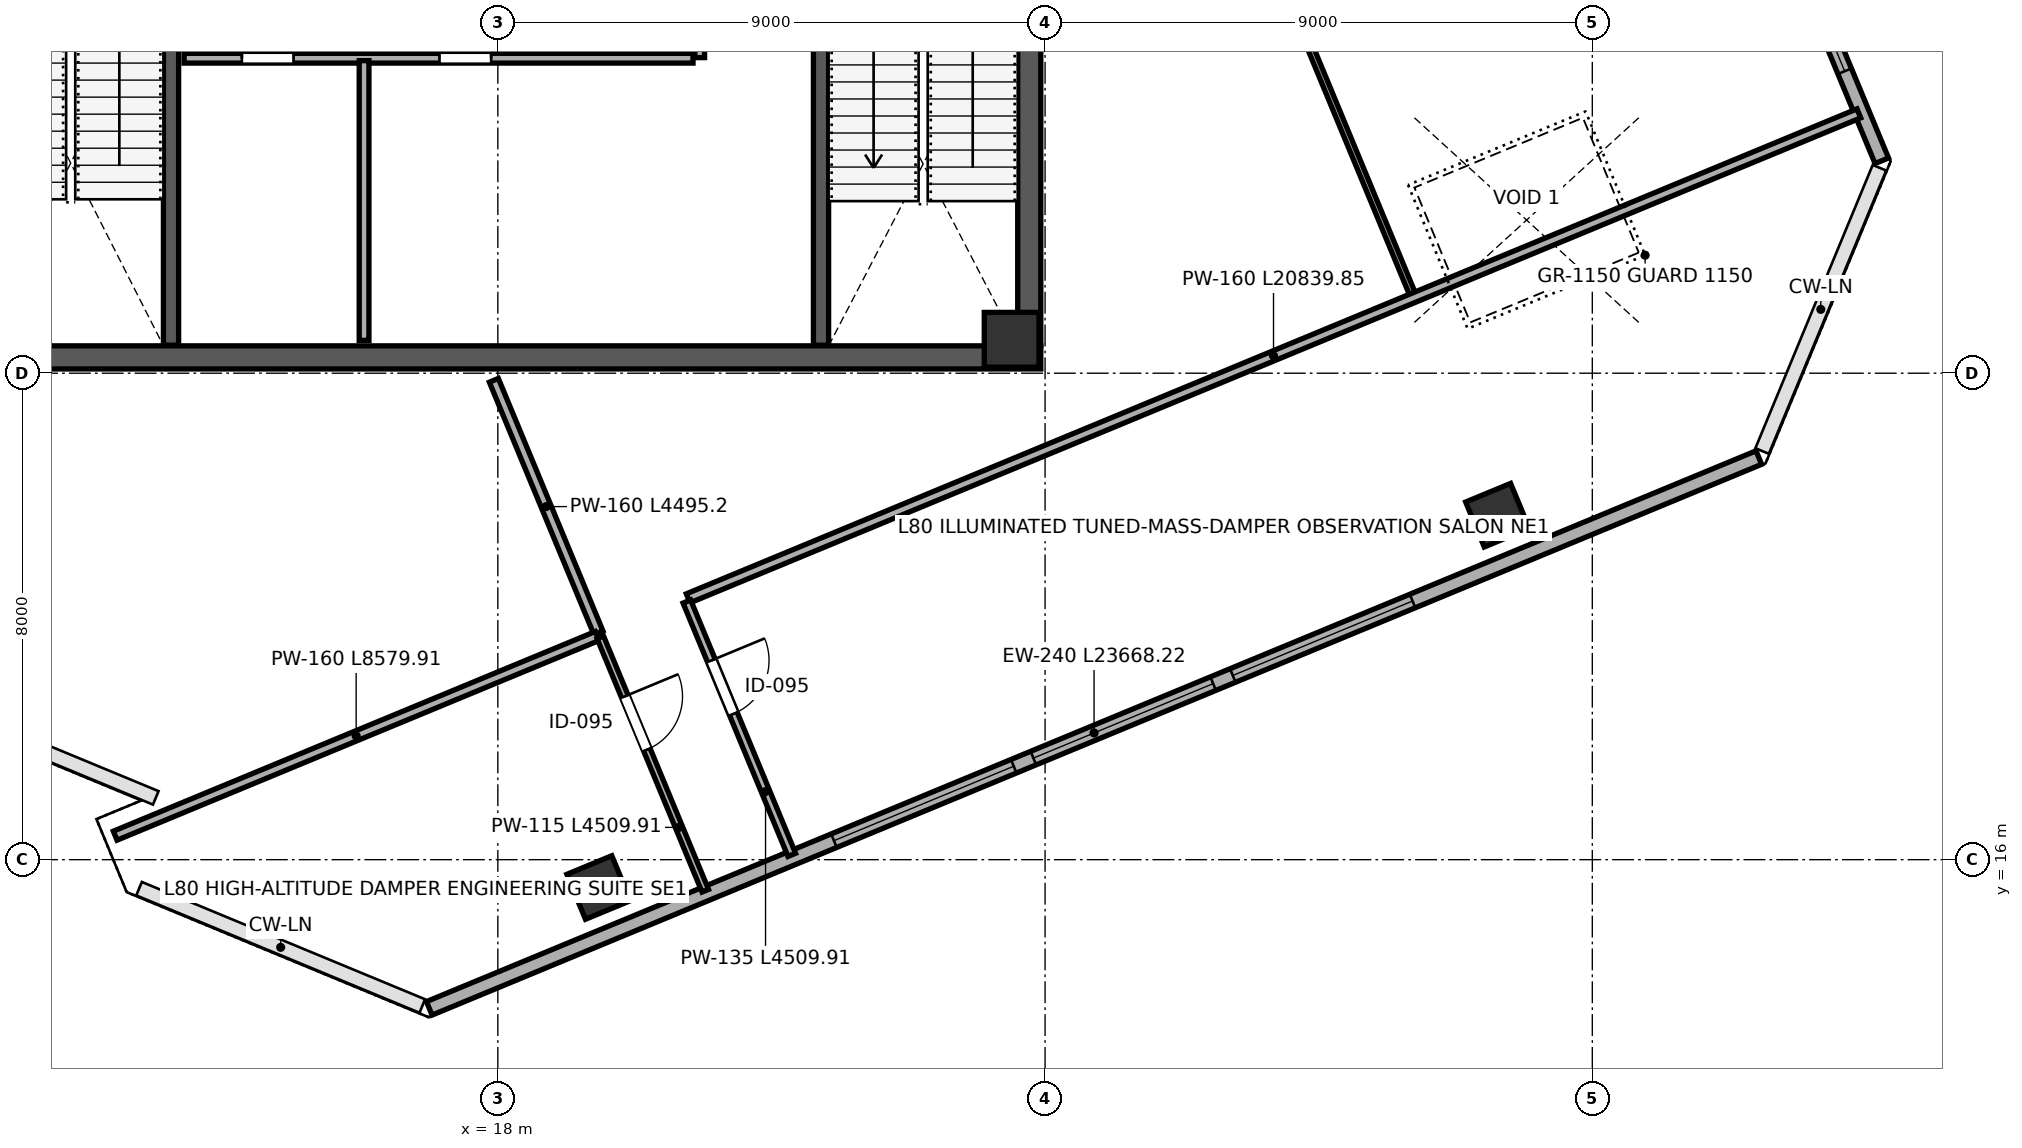
"""IFC4 building model, lengths in metres.
Left out: names, types, materials, properties, quantities, classifications, styles, units other than length and angle.
Written with IfcOpenShell. Run it as: python <this file> out.ifc"""

import sys

from ifc_helpers import new_model, si_unit, direction, frame, frame_2d, origin, origin_2d, place, context, subcontext, project, spatial, rectangle, extrude, source, transform, mapped, element, fill, save


model = new_model("IFC4")
c1 = context("Model", 3, precision=1e-05, world=origin(), true_north=direction((0.0, 1.0)))
c2 = subcontext(c1, "Body", "Model", "MODEL_VIEW")
j1 = project(units=[si_unit("LENGTHUNIT", "METRE"), si_unit("PLANEANGLEUNIT", "RADIAN")], contexts=[c1])
p1 = place(None, origin())
s1 = spatial("IfcSite", under=j1, at=p1, CompositionType="ELEMENT")
p2 = place(p1, origin())
s2 = spatial("IfcBuilding", under=s1, at=p2, CompositionType="ELEMENT")
p3 = place(p2, frame((0.0, 0.0, 355.2)))
s3 = spatial("IfcBuildingStorey", under=s2, at=p3, CompositionType="ELEMENT", Elevation=355.2)
m1 = source(origin(), c2, "Body", "SweptSolid", [
    extrude(rectangle(XDim=0.9, YDim=0.9, at=origin_2d()), origin(), (0.0, 0.0, 1.0), 4.799),
])
p4 = place(p3, frame((26.45, 24.55, 0.001), z_axis=(0.0, 0.0, 1.0), x_axis=(1.0, 0.0, 0.0)))
e1 = element("IfcColumn", 1, at=p4, inside=s3, PredefinedType="COLUMN", context=c2, shape_type="MappedRepresentation", body=[
    mapped(m1, transform((0.0, 0.0, 0.0), scale=1.0)),
])
m2 = source(origin(), c2, "Body", "SweptSolid", [
    extrude(rectangle(XDim=0.8, YDim=0.8, at=origin_2d()), origin(), (0.0, 0.0, 1.0), 4.799),
])
for number, where, z_axis, x_axis in (
    (2, (19.658, 15.542, 0.001), (0.0, 0.0, 1.0), (-0.383, 0.924, 0.0)),
    (3, (34.44, 21.665, 0.001), (0.0, 0.0, 1.0), (-0.383, 0.924, 0.0)),
):
    element("IfcColumn", number, at=place(p3, frame(where, z_axis=z_axis, x_axis=x_axis)), inside=s3, PredefinedType="COLUMN", context=c2, shape_type="MappedRepresentation", body=[
        mapped(m2, transform((0.0, 0.0, 0.0), scale=1.0)),
    ])
p5 = place(p3, frame((16.872, 13.555, 0.0), z_axis=(0.0, 0.0, 1.0), x_axis=(0.923879670053, 0.38268310031, 0.0)))
e4 = element("IfcWall", 4, at=p5, inside=s3, PredefinedType="SOLIDWALL", context=c2, shape_type="SweptSolid", body=[
    extrude(rectangle(XDim=23.668, YDim=0.24, at=frame_2d((11.834, 0.0))), origin(), (0.0, 0.0, 1.0), 4.52),
])
p6 = place(p5, frame((7.204, 0.0, 0.45)))
e5 = element("IfcOpeningElement", 5, at=p6, cuts=e4, PredefinedType="OPENING", context=c2, shape_type="SweptSolid", body=[
    extrude(rectangle(XDim=3.2, YDim=2.5, at=frame_2d((1.6, 1.25))), frame((0.0, 0.13, 0.0), z_axis=(0.0, -1.0, 0.0), x_axis=(1.0, 0.0, 0.0)), (0.0, 0.0, 1.0), 0.26),
])
p7 = place(p5, frame((10.754, 0.0, 0.45)))
e6 = element("IfcOpeningElement", 6, at=p7, cuts=e4, PredefinedType="OPENING", context=c2, shape_type="SweptSolid", body=[
    extrude(rectangle(XDim=3.2, YDim=2.5, at=frame_2d((1.6, 1.25))), frame((0.0, 0.13, 0.0), z_axis=(0.0, -1.0, 0.0), x_axis=(1.0, 0.0, 0.0)), (0.0, 0.0, 1.0), 0.26),
])
p8 = place(p5, frame((14.304, 0.0, 0.45)))
e7 = element("IfcOpeningElement", 7, at=p8, cuts=e4, PredefinedType="OPENING", context=c2, shape_type="SweptSolid", body=[
    extrude(rectangle(XDim=3.2, YDim=2.5, at=frame_2d((1.6, 1.25))), frame((0.0, 0.13, 0.0), z_axis=(0.0, -1.0, 0.0), x_axis=(1.0, 0.0, 0.0)), (0.0, 0.0, 1.0), 0.26),
])
p9 = place(p3, frame((40.761, 27.494, 0.0), z_axis=(0.0, 0.0, 1.0), x_axis=(-0.382690925775, 0.923876428604, 0.0)))
e8 = element("IfcWall", 8, at=p9, inside=s3, PredefinedType="SOLIDWALL", context=c2, shape_type="SweptSolid", body=[
    extrude(rectangle(XDim=25.368, YDim=0.24, at=frame_2d((12.684, 0.0))), origin(), (0.0, 0.0, 1.0), 4.52),
])
p10 = place(p9, frame((1.594, 0.0, 0.45)))
e9 = element("IfcOpeningElement", 9, at=p10, cuts=e8, PredefinedType="OPENING", context=c2, shape_type="SweptSolid", body=[
    extrude(rectangle(XDim=3.2, YDim=2.5, at=frame_2d((1.6, 1.25))), frame((0.0, 0.13, 0.0), z_axis=(0.0, -1.0, 0.0), x_axis=(1.0, 0.0, 0.0)), (0.0, 0.0, 1.0), 0.26),
])
p11 = place(p9, frame((5.144, 0.0, 0.45)))
e10 = element("IfcOpeningElement", 10, at=p11, cuts=e8, PredefinedType="OPENING", context=c2, shape_type="SweptSolid", body=[
    extrude(rectangle(XDim=3.2, YDim=2.5, at=frame_2d((1.6, 1.25))), frame((0.0, 0.13, 0.0), z_axis=(0.0, -1.0, 0.0), x_axis=(1.0, 0.0, 0.0)), (0.0, 0.0, 1.0), 0.26),
])
p12 = place(p9, frame((8.694, 0.0, 0.45)))
e11 = element("IfcOpeningElement", 11, at=p12, cuts=e8, PredefinedType="OPENING", context=c2, shape_type="SweptSolid", body=[
    extrude(rectangle(XDim=3.2, YDim=2.5, at=frame_2d((1.6, 1.25))), frame((0.0, 0.13, 0.0), z_axis=(0.0, -1.0, 0.0), x_axis=(1.0, 0.0, 0.0)), (0.0, 0.0, 1.0), 0.26),
])
p13 = place(p9, frame((12.244, 0.0, 0.45)))
e12 = element("IfcOpeningElement", 12, at=p13, cuts=e8, PredefinedType="OPENING", context=c2, shape_type="SweptSolid", body=[
    extrude(rectangle(XDim=3.2, YDim=2.5, at=frame_2d((1.6, 1.25))), frame((0.0, 0.13, 0.0), z_axis=(0.0, -1.0, 0.0), x_axis=(1.0, 0.0, 0.0)), (0.0, 0.0, 1.0), 0.26),
])
p14 = place(p9, frame((15.794, 0.0, 0.45)))
e13 = element("IfcOpeningElement", 13, at=p14, cuts=e8, PredefinedType="OPENING", context=c2, shape_type="SweptSolid", body=[
    extrude(rectangle(XDim=3.2, YDim=2.5, at=frame_2d((1.6, 1.25))), frame((0.0, 0.13, 0.0), z_axis=(0.0, -1.0, 0.0), x_axis=(1.0, 0.0, 0.0)), (0.0, 0.0, 1.0), 0.26),
])
p15 = place(p9, frame((19.344, 0.0, 0.45)))
e14 = element("IfcOpeningElement", 14, at=p15, cuts=e8, PredefinedType="OPENING", context=c2, shape_type="SweptSolid", body=[
    extrude(rectangle(XDim=3.2, YDim=2.5, at=frame_2d((1.6, 1.25))), frame((0.0, 0.13, 0.0), z_axis=(0.0, -1.0, 0.0), x_axis=(1.0, 0.0, 0.0)), (0.0, 0.0, 1.0), 0.26),
])
p16 = place(p3, frame((26.74, 24.45, 0.0), z_axis=(0.0, 0.0, 1.0), x_axis=(0.0, 1.0, 0.0)))
e15 = element("IfcWall", 15, at=p16, inside=s3, PredefinedType="SHEAR", context=c2, shape_type="SweptSolid", body=[
    extrude(rectangle(XDim=15.1, YDim=0.38, at=frame_2d((7.55, 0.0))), origin(), (0.0, 0.0, 1.0), 4.52),
])
p17 = place(p16, frame((8.6, 0.0, 0.0)))
e16 = element("IfcOpeningElement", 16, at=p17, cuts=e15, PredefinedType="OPENING", context=c2, shape_type="SweptSolid", body=[
    extrude(rectangle(XDim=1.15, YDim=2.2, at=frame_2d((0.575, 1.1))), frame((0.0, 0.2, 0.0), z_axis=(0.0, -1.0, 0.0), x_axis=(1.0, 0.0, 0.0)), (0.0, 0.0, 1.0), 0.4),
])
p18 = place(p3, frame((9.07, 24.26, 0.0), z_axis=(0.0, 0.0, 1.0), x_axis=(1.0, 0.0, 0.0)))
e17 = element("IfcWall", 17, at=p18, inside=s3, PredefinedType="SHEAR", context=c2, shape_type="SweptSolid", body=[
    extrude(rectangle(XDim=17.86, YDim=0.38, at=frame_2d((8.93, 0.0))), origin(), (0.0, 0.0, 1.0), 4.52),
])
p19 = place(p3, frame((12.625, 24.46, 0.0), z_axis=(0.0, 0.0, 1.0), x_axis=(0.0, 1.0, 0.0)))
e18 = element("IfcWall", 18, at=p19, inside=s3, PredefinedType="SHEAR", context=c2, shape_type="SweptSolid", body=[
    extrude(rectangle(XDim=7.49, YDim=0.25, at=frame_2d((3.745, 0.0))), origin(), (0.0, 0.0, 1.0), 4.52),
])
p20 = place(p19, frame((5.85, 0.0, 0.0)))
e19 = element("IfcOpeningElement", 19, at=p20, cuts=e18, PredefinedType="OPENING", context=c2, shape_type="SweptSolid", body=[
    extrude(rectangle(XDim=1.15, YDim=2.2, at=frame_2d((0.575, 1.1))), frame((0.0, 0.135, 0.0), z_axis=(0.0, -1.0, 0.0), x_axis=(1.0, 0.0, 0.0)), (0.0, 0.0, 1.0), 0.27),
])
p21 = place(p3, frame((23.315, 24.46, 0.0), z_axis=(0.0, 0.0, 1.0), x_axis=(0.0, 1.0, 0.0)))
e20 = element("IfcWall", 20, at=p21, inside=s3, PredefinedType="SHEAR", context=c2, shape_type="SweptSolid", body=[
    extrude(rectangle(XDim=7.49, YDim=0.25, at=frame_2d((3.745, 0.0))), origin(), (0.0, 0.0, 1.0), 4.52),
])
p22 = place(p3, frame((12.84, 29.18, 0.0), z_axis=(0.0, 0.0, 1.0), x_axis=(1.0, 0.0, 0.0)))
e21 = element("IfcWall", 21, at=p22, inside=s3, PredefinedType="PARTITIONING", context=c2, shape_type="SweptSolid", body=[
    extrude(rectangle(XDim=8.37, YDim=0.16, at=frame_2d((4.185, 0.0))), origin(), (0.0, 0.0, 1.0), 4.52),
])
p23 = place(p22, frame((0.95, 0.0, 0.0)))
e22 = element("IfcOpeningElement", 22, at=p23, cuts=e21, PredefinedType="OPENING", context=c2, shape_type="SweptSolid", body=[
    extrude(rectangle(XDim=0.85, YDim=2.1, at=frame_2d((0.425, 1.05))), frame((0.0, 0.09, 0.0), z_axis=(0.0, -1.0, 0.0), x_axis=(1.0, 0.0, 0.0)), (0.0, 0.0, 1.0), 0.18),
])
p24 = place(p22, frame((4.2, 0.0, 0.0)))
e23 = element("IfcOpeningElement", 23, at=p24, cuts=e21, PredefinedType="OPENING", context=c2, shape_type="SweptSolid", body=[
    extrude(rectangle(XDim=0.85, YDim=2.1, at=frame_2d((0.425, 1.05))), frame((0.0, 0.09, 0.0), z_axis=(0.0, -1.0, 0.0), x_axis=(1.0, 0.0, 0.0)), (0.0, 0.0, 1.0), 0.18),
])
p25 = place(p3, frame((15.8, 24.54, 0.0), z_axis=(0.0, 0.0, 1.0), x_axis=(0.0, 1.0, 0.0)))
e24 = element("IfcWall", 24, at=p25, inside=s3, PredefinedType="PARTITIONING", context=c2, shape_type="SweptSolid", body=[
    extrude(rectangle(XDim=4.6, YDim=0.16, at=frame_2d((2.3, 0.0))), origin(), (0.0, 0.0, 1.0), 4.52),
])
p26 = place(p3, frame((21.32, 29.19, 0.0), z_axis=(0.0, 0.0, 1.0), x_axis=(0.0, 1.0, 0.0)))
e25 = element("IfcWall", 25, at=p26, inside=s3, PredefinedType="PARTITIONING", context=c2, shape_type="SweptSolid", body=[
    extrude(rectangle(XDim=2.92, YDim=0.16, at=frame_2d((1.46, 0.0))), origin(), (0.0, 0.0, 1.0), 4.52),
])
p27 = place(p3, frame((17.935, 23.883, 0.0), z_axis=(0.0, 0.0, 1.0), x_axis=(0.382674767732, -0.923883121472, 0.0)))
e26 = element("IfcWall", 26, at=p27, inside=s3, PredefinedType="PARTITIONING", context=c2, shape_type="SweptSolid", body=[
    extrude(rectangle(XDim=4.495, YDim=0.16, at=frame_2d((2.248, 0.0))), origin(), (0.0, 0.0, 1.0), 4.52),
])
p28 = place(p3, frame((28.061, 37.326, 0.0), z_axis=(0.0, 0.0, 1.0), x_axis=(0.382702889353, -0.923871472923, 0.0)))
e27 = element("IfcWall", 27, at=p28, inside=s3, PredefinedType="PARTITIONING", context=c2, shape_type="SweptSolid", body=[
    extrude(rectangle(XDim=13.04, YDim=0.1, at=frame_2d((6.52, 0.0))), origin(), (0.0, 0.0, 1.0), 4.52),
])
p29 = place(p3, frame((21.13, 20.298, 0.0), z_axis=(0.0, 0.0, 1.0), x_axis=(0.923880046805, 0.382682190748, 0.0)))
e28 = element("IfcWall", 28, at=p29, inside=s3, PredefinedType="PARTITIONING", context=c2, shape_type="SweptSolid", body=[
    extrude(rectangle(XDim=20.84, YDim=0.16, at=frame_2d((10.42, 0.0))), origin(), (0.0, 0.0, 1.0), 4.52),
])
p30 = place(p3, frame((11.707, 16.394, 0.0), z_axis=(0.0, 0.0, 1.0), x_axis=(0.923876372956, 0.382691060117, 0.0)))
e29 = element("IfcWall", 29, at=p30, inside=s3, PredefinedType="PARTITIONING", context=c2, shape_type="SweptSolid", body=[
    extrude(rectangle(XDim=8.58, YDim=0.16, at=frame_2d((4.29, 0.0))), origin(), (0.0, 0.0, 1.0), 4.52),
])
p31 = place(p3, frame((21.108, 20.245, 0.0), z_axis=(0.0, 0.0, 1.0), x_axis=(0.382731086891, -0.923859791921, 0.0)))
e30 = element("IfcWall", 30, at=p31, inside=s3, PredefinedType="PARTITIONING", context=c2, shape_type="SweptSolid", body=[
    extrude(rectangle(XDim=4.51, YDim=0.135, at=frame_2d((2.255, 0.0))), origin(), (0.0, 0.0, 1.0), 4.52),
])
p32 = place(p31, frame((1.05, 0.0, 0.0)))
e31 = element("IfcOpeningElement", 31, at=p32, cuts=e30, PredefinedType="OPENING", context=c2, shape_type="SweptSolid", body=[
    extrude(rectangle(XDim=0.95, YDim=2.15, at=frame_2d((0.475, 1.075))), frame((0.0, 0.078, 0.0), z_axis=(0.0, -1.0, 0.0), x_axis=(1.0, 0.0, 0.0)), (0.0, 0.0, 1.0), 0.155),
])
p33 = place(p3, frame((19.686, 19.656, 0.0), z_axis=(0.0, 0.0, 1.0), x_axis=(0.382684880723, -0.923878932581, 0.0)))
e32 = element("IfcWall", 32, at=p33, inside=s3, PredefinedType="PARTITIONING", context=c2, shape_type="SweptSolid", body=[
    extrude(rectangle(XDim=4.51, YDim=0.115, at=frame_2d((2.255, 0.0))), origin(), (0.0, 0.0, 1.0), 4.52),
])
p34 = place(p33, frame((1.05, 0.0, 0.0)))
e33 = element("IfcOpeningElement", 33, at=p34, cuts=e32, PredefinedType="OPENING", context=c2, shape_type="SweptSolid", body=[
    extrude(rectangle(XDim=0.95, YDim=2.15, at=frame_2d((0.475, 1.075))), frame((0.0, 0.067, 0.0), z_axis=(0.0, -1.0, 0.0), x_axis=(1.0, 0.0, 0.0)), (0.0, 0.0, 1.0), 0.135),
])
m3 = source(origin(), c2, "Body", "SweptSolid", [
    extrude(rectangle(XDim=3.2, YDim=2.5, at=frame_2d((1.6, 1.25))), frame((0.0, 0.03, 0.0), z_axis=(0.0, -1.0, 0.0), x_axis=(1.0, 0.0, 0.0)), (0.0, 0.0, 1.0), 0.06),
])
p35 = place(p6, origin())
e34 = element("IfcWindow", 34, at=p35, inside=s3, PartitioningType="TRIPLE_PANEL_VERTICAL", PredefinedType="WINDOW", context=c2, shape_type="MappedRepresentation", body=[
    mapped(m3, transform((0.0, 0.0, 0.0), scale=1.0)),
])
fill(e5, e34)
p36 = place(p7, origin())
e35 = element("IfcWindow", 35, at=p36, inside=s3, PartitioningType="TRIPLE_PANEL_VERTICAL", PredefinedType="WINDOW", context=c2, shape_type="MappedRepresentation", body=[
    mapped(m3, transform((0.0, 0.0, 0.0), scale=1.0)),
])
fill(e6, e35)
p37 = place(p8, origin())
e36 = element("IfcWindow", 36, at=p37, inside=s3, PartitioningType="TRIPLE_PANEL_VERTICAL", PredefinedType="WINDOW", context=c2, shape_type="MappedRepresentation", body=[
    mapped(m3, transform((0.0, 0.0, 0.0), scale=1.0)),
])
fill(e7, e36)
p38 = place(p10, origin())
e37 = element("IfcWindow", 37, at=p38, inside=s3, PartitioningType="TRIPLE_PANEL_VERTICAL", PredefinedType="WINDOW", context=c2, shape_type="MappedRepresentation", body=[
    mapped(m3, transform((0.0, 0.0, 0.0), scale=1.0)),
])
fill(e9, e37)
m4 = source(origin(), c2, "Body", "SweptSolid", [
    extrude(rectangle(XDim=0.85, YDim=2.1, at=frame_2d((0.425, 1.05))), frame((0.0, 0.025, 0.0), z_axis=(0.0, -1.0, 0.0), x_axis=(1.0, 0.0, 0.0)), (0.0, 0.0, 1.0), 0.05),
])
p39 = place(p23, origin())
e38 = element("IfcDoor", 38, at=p39, inside=s3, OperationType="SINGLE_SWING_LEFT", PredefinedType="DOOR", context=c2, shape_type="MappedRepresentation", body=[
    mapped(m4, transform((0.0, 0.0, 0.0), scale=1.0)),
])
fill(e22, e38)
p40 = place(p24, origin())
e39 = element("IfcDoor", 39, at=p40, inside=s3, OperationType="SINGLE_SWING_RIGHT", PredefinedType="DOOR", context=c2, shape_type="MappedRepresentation", body=[
    mapped(m4, transform((0.0, 0.0, 0.0), scale=1.0)),
])
fill(e23, e39)
m5 = source(origin(), c2, "Body", "SweptSolid", [
    extrude(rectangle(XDim=0.95, YDim=2.15, at=frame_2d((0.475, 1.075))), frame((0.0, 0.025, 0.0), z_axis=(0.0, -1.0, 0.0), x_axis=(1.0, 0.0, 0.0)), (0.0, 0.0, 1.0), 0.05),
])
p41 = place(p32, origin())
e40 = element("IfcDoor", 40, at=p41, inside=s3, OperationType="SINGLE_SWING_LEFT", PredefinedType="DOOR", context=c2, shape_type="MappedRepresentation", body=[
    mapped(m5, transform((0.0, 0.0, 0.0), scale=1.0)),
])
fill(e31, e40)
p42 = place(p34, origin())
e41 = element("IfcDoor", 41, at=p42, inside=s3, OperationType="SINGLE_SWING_LEFT", PredefinedType="DOOR", context=c2, shape_type="MappedRepresentation", body=[
    mapped(m5, transform((0.0, 0.0, 0.0), scale=1.0)),
])
fill(e33, e41)
save(model, sys.argv[1])
